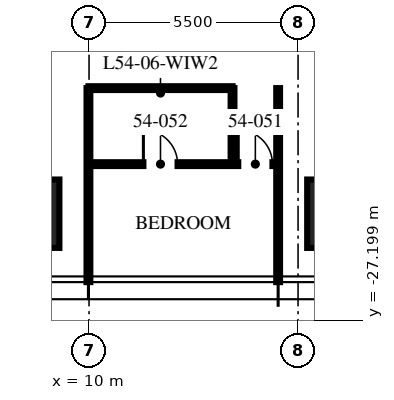
"""IFC4 building model, lengths in metres.
Left out: names, types, materials, properties, quantities, classifications, styles, units other than length and angle.
Written with IfcOpenShell. Run it as: python <this file> out.ifc"""

import sys

from ifc_helpers import new_model, si_unit, direction, frame, frame_2d, origin, origin_2d, place, context, subcontext, project, spatial, rectangle, extrude, element, fill, save


model = new_model("IFC4")
c1 = context("Model", 3, precision=1e-05, world=origin(), true_north=direction((0.0, 1.0)))
c2 = subcontext(c1, "Body", "Model", "MODEL_VIEW")
j1 = project(units=[si_unit("LENGTHUNIT", "METRE"), si_unit("PLANEANGLEUNIT", "RADIAN")], contexts=[c1])
p1 = place(None, origin())
s1 = spatial("IfcSite", under=j1, at=p1, CompositionType="ELEMENT")
p2 = place(p1, origin())
s2 = spatial("IfcBuilding", under=s1, at=p2, CompositionType="ELEMENT")
p3 = place(p2, frame((0.0, 0.0, 218.25)))
s3 = spatial("IfcBuildingStorey", under=s2, at=p3, CompositionType="ELEMENT", Elevation=218.25)
for number, where, z_axis, x_axis in (
    (1, (16.64, -24.4, 0.0), (0.0, 0.0, 1.0), (1.0, 0.0, 0.0)),
    (2, (8.32, -24.4, 0.0), (0.0, 0.0, 1.0), (1.0, 0.0, 0.0)),
):
    element("IfcColumn", number, at=place(p3, frame(where, z_axis=z_axis, x_axis=x_axis)), inside=s3, PredefinedType="COLUMN", context=c2, shape_type="SweptSolid", body=[
        extrude(rectangle(XDim=1.8, YDim=1.8, at=origin_2d()), origin(), (0.0, 0.0, 1.0), 3.75),
    ])
for number, where, z_axis, x_axis in (
    (3, (9.984, -21.095, 0.0), (0.0, 0.0, 1.0), (0.0, -1.0, 0.0)),
    (4, (14.976, -21.095, 0.0), (0.0, 0.0, 1.0), (0.0, -1.0, 0.0)),
):
    element("IfcWall", number, at=place(p3, frame(where, z_axis=z_axis, x_axis=x_axis)), inside=s3, PredefinedType="PARTITIONING", context=c2, shape_type="SweptSolid", body=[
        extrude(rectangle(XDim=5.105, YDim=0.1, at=frame_2d((2.552, 0.0))), origin(), (0.0, 0.0, 1.0), 2.91),
    ])
p4 = place(p3, frame((9.984, -23.095, 0.0), z_axis=(0.0, 0.0, 1.0), x_axis=(1.0, 0.0, 0.0)))
e5 = element("IfcWall", 5, at=p4, inside=s3, PredefinedType="PARTITIONING", context=c2, shape_type="SweptSolid", body=[
    extrude(rectangle(XDim=4.992, YDim=0.1, at=frame_2d((2.496, 0.0))), origin(), (0.0, 0.0, 1.0), 2.81),
])
p5 = place(p4, frame((3.942, 0.0, 0.0)))
e6 = element("IfcOpeningElement", 6, at=p5, cuts=e5, PredefinedType="OPENING", context=c2, shape_type="SweptSolid", body=[
    extrude(rectangle(XDim=0.9, YDim=2.1, at=frame_2d((0.45, 1.05))), frame((0.0, 0.06, 0.0), z_axis=(0.0, -1.0, 0.0), x_axis=(1.0, 0.0, 0.0)), (0.0, 0.0, 1.0), 0.12),
])
p6 = place(p4, frame((1.446, 0.0, 0.0)))
e7 = element("IfcOpeningElement", 7, at=p6, cuts=e5, PredefinedType="OPENING", context=c2, shape_type="SweptSolid", body=[
    extrude(rectangle(XDim=0.9, YDim=2.1, at=frame_2d((0.45, 1.05))), frame((0.0, 0.06, 0.0), z_axis=(0.0, -1.0, 0.0), x_axis=(1.0, 0.0, 0.0)), (0.0, 0.0, 1.0), 0.12),
])
p7 = place(p3, frame((13.776, -21.095, 0.0), z_axis=(0.0, 0.0, 1.0), x_axis=(0.0, -1.0, 0.0)))
e8 = element("IfcWall", 8, at=p7, inside=s3, PredefinedType="PARTITIONING", context=c2, shape_type="SweptSolid", body=[
    extrude(rectangle(XDim=2.0, YDim=0.1, at=frame_2d((1.0, 0.0))), origin(), (0.0, 0.0, 1.0), 3.5),
])
p8 = place(p3, frame((9.984, -21.095, 0.0), z_axis=(0.0, 0.0, 1.0), x_axis=(1.0, 0.0, 0.0)))
e9 = element("IfcWall", 9, at=p8, inside=s3, PredefinedType="PARTITIONING", context=c2, shape_type="SweptSolid", body=[
    extrude(rectangle(XDim=3.792, YDim=0.1, at=frame_2d((1.896, 0.0))), origin(), (0.0, 0.0, 1.0), 2.81),
])
p9 = place(p5, origin())
e10 = element("IfcDoor", 10, at=p9, inside=s3, OperationType="SINGLE_SWING_LEFT", PredefinedType="DOOR", context=c2, shape_type="SweptSolid", body=[
    extrude(rectangle(XDim=0.9, YDim=2.1, at=frame_2d((0.45, 1.05))), frame((0.0, 0.025, 0.0), z_axis=(0.0, -1.0, 0.0), x_axis=(1.0, 0.0, 0.0)), (0.0, 0.0, 1.0), 0.05),
])
fill(e6, e10)
p10 = place(p6, origin())
e11 = element("IfcDoor", 11, at=p10, inside=s3, OperationType="SINGLE_SWING_LEFT", PredefinedType="DOOR", context=c2, shape_type="SweptSolid", body=[
    extrude(rectangle(XDim=0.9, YDim=2.1, at=frame_2d((0.45, 1.05))), frame((0.0, 0.025, 0.0), z_axis=(0.0, -1.0, 0.0), x_axis=(1.0, 0.0, 0.0)), (0.0, 0.0, 1.0), 0.05),
])
fill(e7, e11)
save(model, sys.argv[1])
